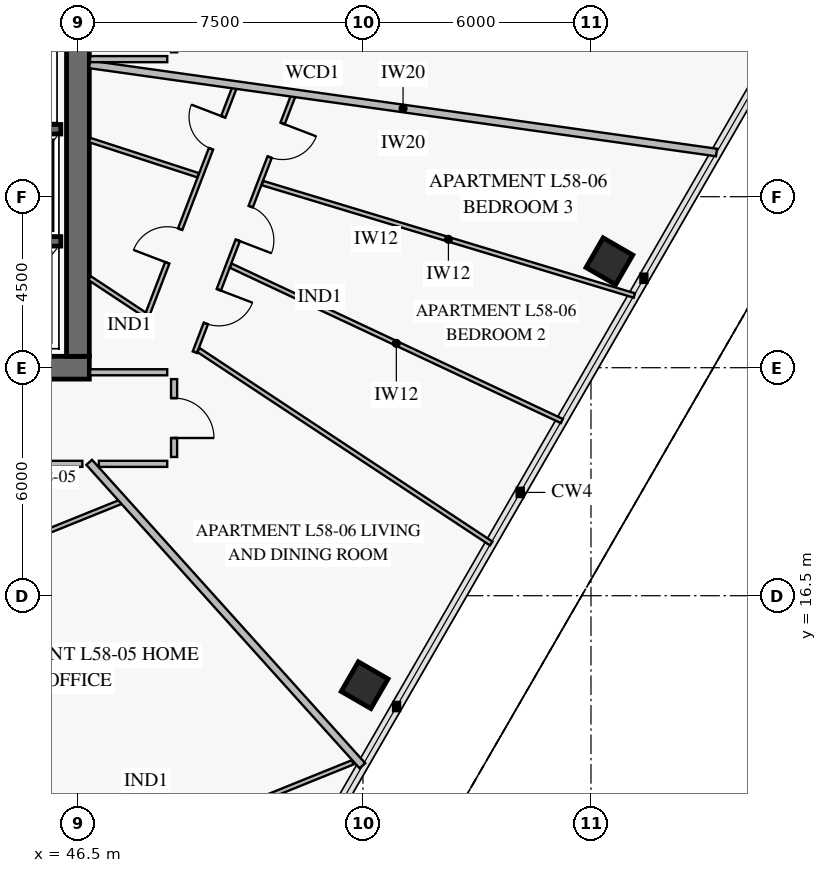
"""IFC4 building model, lengths in metres.
Left out: names, types, materials, properties, quantities, classifications, styles, units other than length and angle.
Written with IfcOpenShell. Run it as: python <this file> out.ifc"""

import sys

from ifc_helpers import new_model, si_unit, direction, frame, frame_2d, origin, origin_2d, place, context, subcontext, project, spatial, rectangle, extrude, element, fill, save


model = new_model("IFC4")
c1 = context("Model", 3, precision=1e-05, world=origin(), true_north=direction((0.0, 1.0)))
c2 = subcontext(c1, "Body", "Model", "MODEL_VIEW")
j1 = project(units=[si_unit("LENGTHUNIT", "METRE"), si_unit("PLANEANGLEUNIT", "RADIAN")], contexts=[c1])
p1 = place(None, origin())
s1 = spatial("IfcSite", under=j1, at=p1, CompositionType="ELEMENT")
p2 = place(p1, origin())
s2 = spatial("IfcBuilding", under=s1, at=p2, CompositionType="ELEMENT")
p3 = place(p2, frame((0.0, 0.0, 231.2)))
s3 = spatial("IfcBuildingStorey", under=s2, at=p3, CompositionType="ELEMENT", Elevation=231.2)
p4 = place(p3, frame((37.35, 22.5, 0.0), z_axis=(0.0, 0.0, 1.0), x_axis=(1.0, 0.0, 0.0)))
e1 = element("IfcWall", 1, at=p4, inside=s3, PredefinedType="SHEAR", context=c2, shape_type="SweptSolid", body=[
    extrude(rectangle(XDim=9.45, YDim=0.6, at=frame_2d((4.725, 0.0))), origin(), (0.0, 0.0, 1.0), 3.8),
])
p5 = place(p4, frame((3.95, 0.0, 0.0)))
e2 = element("IfcOpeningElement", 2, at=p5, cuts=e1, PredefinedType="OPENING", context=c2, shape_type="SweptSolid", body=[
    extrude(rectangle(XDim=1.5, YDim=2.15, at=frame_2d((0.75, 1.075))), frame((0.0, 0.312, 0.0), z_axis=(0.0, -1.0, 0.0), x_axis=(1.0, 0.0, 0.0)), (0.0, 0.0, 1.0), 0.624),
])
p6 = place(p3, frame((46.5, 22.8, 0.0), z_axis=(0.0, 0.0, 1.0), x_axis=(0.0, 1.0, 0.0)))
e3 = element("IfcWall", 3, at=p6, inside=s3, PredefinedType="SHEAR", context=c2, shape_type="SweptSolid", body=[
    extrude(rectangle(XDim=18.4, YDim=0.6, at=frame_2d((9.2, 0.0))), origin(), (0.0, 0.0, 1.0), 3.8),
])
p7 = place(p6, frame((8.95, 0.0, 0.0)))
e4 = element("IfcOpeningElement", 4, at=p7, cuts=e3, PredefinedType="OPENING", context=c2, shape_type="SweptSolid", body=[
    extrude(rectangle(XDim=1.1, YDim=2.15, at=frame_2d((0.55, 1.075))), frame((0.0, 0.312, 0.0), z_axis=(0.0, -1.0, 0.0), x_axis=(1.0, 0.0, 0.0)), (0.0, 0.0, 1.0), 0.624),
])
for number, where, z_axis, x_axis in (
    (5, (54.044, 14.145, 0.0), (0.0, 0.0, 1.0), (0.5, 0.866, 0.0)),
    (6, (60.485, 25.301, 0.0), (0.0, 0.0, 1.0), (0.5, 0.866, 0.0)),
):
    element("IfcColumn", number, at=place(p3, frame(where, z_axis=z_axis, x_axis=x_axis)), inside=s3, PredefinedType="COLUMN", context=c2, shape_type="SweptSolid", body=[
        extrude(rectangle(XDim=0.9, YDim=0.9, at=origin_2d()), origin(), (0.0, 0.0, 1.0), 3.55),
    ])
for number, where, z_axis, x_axis in (
    (7, (43.8, 25.825, 0.0), (0.0, 0.0, 1.0), (1.0, 0.0, 0.0)),
    (8, (43.8, 28.775, 0.0), (0.0, 0.0, 1.0), (1.0, 0.0, 0.0)),
):
    element("IfcWall", number, at=place(p3, frame(where, z_axis=z_axis, x_axis=x_axis)), inside=s3, PredefinedType="SOLIDWALL", context=c2, shape_type="SweptSolid", body=[
        extrude(rectangle(XDim=2.25, YDim=0.25, at=frame_2d((1.125, 0.0))), origin(), (0.0, 0.0, 1.0), 3.8),
    ])
p8 = place(p3, frame((43.554, 8.004, 0.0), z_axis=(0.0, 0.0, 1.0), x_axis=(0.927183582348, 0.374607267179, 0.0)))
e9 = element("IfcWall", 9, at=p8, inside=s3, PredefinedType="PARTITIONING", context=c2, shape_type="SweptSolid", body=[
    extrude(rectangle(XDim=10.972, YDim=0.12, at=frame_2d((5.486, 0.0))), origin(), (0.0, 0.0, 1.0), 2.93),
])
p9 = place(p8, frame((4.927, 0.0, 0.0)))
e10 = element("IfcOpeningElement", 10, at=p9, cuts=e9, PredefinedType="OPENING", context=c2, shape_type="SweptSolid", body=[
    extrude(rectangle(XDim=0.95, YDim=2.1, at=frame_2d((0.475, 1.05))), frame((0.0, 0.072, 0.0), z_axis=(0.0, -1.0, 0.0), x_axis=(1.0, 0.0, 0.0)), (0.0, 0.0, 1.0), 0.144),
])
p10 = place(p3, frame((48.278, 23.766, 0.0), z_axis=(0.0, 0.0, 1.0), x_axis=(0.358042156754, 0.933705421419, 0.0)))
e11 = element("IfcWall", 11, at=p10, inside=s3, PredefinedType="PARTITIONING", context=c2, shape_type="SweptSolid", body=[
    extrude(rectangle(XDim=6.584, YDim=0.12, at=frame_2d((3.292, 0.0))), origin(), (0.0, 0.0, 1.0), 2.95),
])
p11 = place(p10, frame((1.599, 0.0, 0.0)))
e12 = element("IfcOpeningElement", 12, at=p11, cuts=e11, PredefinedType="OPENING", context=c2, shape_type="SweptSolid", body=[
    extrude(rectangle(XDim=0.95, YDim=2.1, at=frame_2d((0.475, 1.05))), frame((0.0, 0.072, 0.0), z_axis=(0.0, -1.0, 0.0), x_axis=(1.0, 0.0, 0.0)), (0.0, 0.0, 1.0), 0.144),
])
p12 = place(p10, frame((4.814, 0.0, 0.0)))
e13 = element("IfcOpeningElement", 13, at=p12, cuts=e11, PredefinedType="OPENING", context=c2, shape_type="SweptSolid", body=[
    extrude(rectangle(XDim=0.9, YDim=2.1, at=frame_2d((0.45, 1.05))), frame((0.0, 0.072, 0.0), z_axis=(0.0, -1.0, 0.0), x_axis=(1.0, 0.0, 0.0)), (0.0, 0.0, 1.0), 0.144),
])
p13 = place(p3, frame((49.576, 22.908, 0.0), z_axis=(0.0, 0.0, 1.0), x_axis=(0.358041112014, 0.933705822038, 0.0)))
e14 = element("IfcWall", 14, at=p13, inside=s3, PredefinedType="PARTITIONING", context=c2, shape_type="SweptSolid", body=[
    extrude(rectangle(XDim=7.257, YDim=0.12, at=frame_2d((3.629, 0.0))), origin(), (0.0, 0.0, 1.0), 2.95),
])
p14 = place(p13, frame((0.81, 0.0, 0.0)))
e15 = element("IfcOpeningElement", 15, at=p14, cuts=e14, PredefinedType="OPENING", context=c2, shape_type="SweptSolid", body=[
    extrude(rectangle(XDim=0.95, YDim=2.1, at=frame_2d((0.475, 1.05))), frame((0.0, 0.072, 0.0), z_axis=(0.0, -1.0, 0.0), x_axis=(1.0, 0.0, 0.0)), (0.0, 0.0, 1.0), 0.144),
])
p15 = place(p13, frame((3.154, 0.0, 0.0)))
e16 = element("IfcOpeningElement", 16, at=p15, cuts=e14, PredefinedType="OPENING", context=c2, shape_type="SweptSolid", body=[
    extrude(rectangle(XDim=0.95, YDim=2.1, at=frame_2d((0.475, 1.05))), frame((0.0, 0.072, 0.0), z_axis=(0.0, -1.0, 0.0), x_axis=(1.0, 0.0, 0.0)), (0.0, 0.0, 1.0), 0.144),
])
p16 = place(p13, frame((5.497, 0.0, 0.0)))
e17 = element("IfcOpeningElement", 17, at=p16, cuts=e14, PredefinedType="OPENING", context=c2, shape_type="SweptSolid", body=[
    extrude(rectangle(XDim=0.95, YDim=2.1, at=frame_2d((0.475, 1.05))), frame((0.0, 0.072, 0.0), z_axis=(0.0, -1.0, 0.0), x_axis=(1.0, 0.0, 0.0)), (0.0, 0.0, 1.0), 0.144),
])
p17 = place(p3, frame((49.03, 20.151, 0.0), z_axis=(0.0, 0.0, 1.0), x_axis=(0.0, 1.0, 0.0)))
e18 = element("IfcWall", 18, at=p17, inside=s3, PredefinedType="PARTITIONING", context=c2, shape_type="SweptSolid", body=[
    extrude(rectangle(XDim=2.049, YDim=0.16, at=frame_2d((1.024, 0.0))), origin(), (0.0, 0.0, 1.0), 3.55),
])
p18 = place(p17, frame((0.499, 0.0, 0.0)))
e19 = element("IfcOpeningElement", 19, at=p18, cuts=e18, PredefinedType="OPENING", context=c2, shape_type="SweptSolid", body=[
    extrude(rectangle(XDim=1.05, YDim=2.15, at=frame_2d((0.525, 1.075))), frame((0.0, 0.092, 0.0), z_axis=(0.0, -1.0, 0.0), x_axis=(1.0, 0.0, 0.0)), (0.0, 0.0, 1.0), 0.184),
])
p19 = place(p3, frame((40.973, 16.281, 0.0), z_axis=(0.0, 0.0, 1.0), x_axis=(0.927185708854, 0.374602003862, 0.0)))
e20 = element("IfcWall", 20, at=p19, inside=s3, PredefinedType="PARTITIONING", context=c2, shape_type="SweptSolid", body=[
    extrude(rectangle(XDim=7.204, YDim=0.12, at=frame_2d((3.602, 0.0))), origin(), (0.0, 0.0, 1.0), 3.55),
])
p20 = place(p3, frame((46.796, 20.01, 0.0), z_axis=(0.0, 0.0, 1.0), x_axis=(0.669124143022, -0.743150645041, 0.0)))
e21 = element("IfcWall", 21, at=p20, inside=s3, PredefinedType="PARTITIONING", context=c2, shape_type="SweptSolid", body=[
    extrude(rectangle(XDim=10.745, YDim=0.2, at=frame_2d((5.373, 0.0))), origin(), (0.0, 0.0, 1.0), 2.93),
])
p21 = place(p3, frame((46.808, 28.491, 0.0), z_axis=(0.0, 0.0, 1.0), x_axis=(0.951120145706, -0.308821094538, 0.0)))
e22 = element("IfcWall", 22, at=p21, inside=s3, PredefinedType="PARTITIONING", context=c2, shape_type="SweptSolid", body=[
    extrude(rectangle(XDim=3.0, YDim=0.12, at=frame_2d((1.5, 0.0))), origin(), (0.0, 0.0, 1.0), 3.55),
])
p22 = place(p3, frame((50.522, 25.185, 0.0), z_axis=(0.0, 0.0, 1.0), x_axis=(0.905267210554, -0.424842650278, 0.0)))
e23 = element("IfcWall", 23, at=p22, inside=s3, PredefinedType="PARTITIONING", context=c2, shape_type="SweptSolid", body=[
    extrude(rectangle(XDim=9.624, YDim=0.12, at=frame_2d((4.812, 0.0))), origin(), (0.0, 0.0, 1.0), 2.93),
])
p23 = place(p3, frame((51.356, 27.358, 0.0), z_axis=(0.0, 0.0, 1.0), x_axis=(0.957218811374, -0.289365075903, 0.0)))
e24 = element("IfcWall", 24, at=p23, inside=s3, PredefinedType="PARTITIONING", context=c2, shape_type="SweptSolid", body=[
    extrude(rectangle(XDim=10.223, YDim=0.12, at=frame_2d((5.112, 0.0))), origin(), (0.0, 0.0, 1.0), 2.93),
])
p24 = place(p3, frame((46.808, 24.857, 0.0), z_axis=(0.0, 0.0, 1.0), x_axis=(0.834229042932, -0.551418084514, 0.0)))
e25 = element("IfcWall", 25, at=p24, inside=s3, PredefinedType="PARTITIONING", context=c2, shape_type="SweptSolid", body=[
    extrude(rectangle(XDim=1.736, YDim=0.12, at=frame_2d((0.868, 0.0))), origin(), (0.0, 0.0, 1.0), 3.55),
])
p25 = place(p3, frame((49.671, 22.965, 0.0), z_axis=(0.0, 0.0, 1.0), x_axis=(0.834276896683, -0.551345680731, 0.0)))
e26 = element("IfcWall", 26, at=p25, inside=s3, PredefinedType="PARTITIONING", context=c2, shape_type="SweptSolid", body=[
    extrude(rectangle(XDim=9.233, YDim=0.12, at=frame_2d((4.616, 0.0))), origin(), (0.0, 0.0, 1.0), 2.93),
])
p26 = place(p3, frame((46.808, 30.481, 0.0), z_axis=(0.0, 0.0, 1.0), x_axis=(0.990266776737, -0.139182293739, 0.0)))
e27 = element("IfcWall", 27, at=p26, inside=s3, PredefinedType="PARTITIONING", context=c2, shape_type="SweptSolid", body=[
    extrude(rectangle(XDim=16.657, YDim=0.2, at=frame_2d((8.329, 0.0))), origin(), (0.0, 0.0, 1.0), 2.93),
])
p27 = place(p3, frame((39.823, 19.97, 0.0), z_axis=(0.0, 0.0, 1.0), x_axis=(1.0, 0.0, 0.0)))
e28 = element("IfcWall", 28, at=p27, inside=s3, PredefinedType="PARTITIONING", context=c2, shape_type="SweptSolid", body=[
    extrude(rectangle(XDim=6.794, YDim=0.16, at=frame_2d((3.397, 0.0))), origin(), (0.0, 0.0, 1.0), 3.55),
])
p28 = place(p3, frame((48.849, 22.38, 0.0), z_axis=(0.0, 0.0, 1.0), x_axis=(-1.0, 0.0, 0.0)))
e29 = element("IfcWall", 29, at=p28, inside=s3, PredefinedType="PARTITIONING", context=c2, shape_type="SweptSolid", body=[
    extrude(rectangle(XDim=2.029, YDim=0.16, at=frame_2d((1.015, 0.0))), origin(), (0.0, 0.0, 1.0), 3.55),
])
p29 = place(p3, frame((47.051, 19.97, 0.0), z_axis=(0.0, 0.0, 1.0), x_axis=(1.0, 0.0, 0.0)))
e30 = element("IfcWall", 30, at=p29, inside=s3, PredefinedType="PARTITIONING", context=c2, shape_type="SweptSolid", body=[
    extrude(rectangle(XDim=1.799, YDim=0.16, at=frame_2d((0.899, 0.0))), origin(), (0.0, 0.0, 1.0), 2.95),
])
p30 = place(p3, frame((46.82, 30.62, 0.0), z_axis=(0.0, 0.0, 1.0), x_axis=(1.0, 0.0, 0.0)))
e31 = element("IfcWall", 31, at=p30, inside=s3, PredefinedType="PARTITIONING", context=c2, shape_type="SweptSolid", body=[
    extrude(rectangle(XDim=2.03, YDim=0.16, at=frame_2d((1.015, 0.0))), origin(), (0.0, 0.0, 1.0), 3.55),
])
p31 = place(p11, origin())
e32 = element("IfcDoor", 32, at=p31, inside=s3, OperationType="SINGLE_SWING_LEFT", PredefinedType="DOOR", context=c2, shape_type="SweptSolid", body=[
    extrude(rectangle(XDim=0.95, YDim=2.1, at=frame_2d((0.475, 1.05))), frame((0.0, 0.025, 0.0), z_axis=(0.0, -1.0, 0.0), x_axis=(1.0, 0.0, 0.0)), (0.0, 0.0, 1.0), 0.05),
])
fill(e12, e32)
p32 = place(p12, origin())
e33 = element("IfcDoor", 33, at=p32, inside=s3, OperationType="SINGLE_SWING_RIGHT", PredefinedType="DOOR", context=c2, shape_type="SweptSolid", body=[
    extrude(rectangle(XDim=0.9, YDim=2.1, at=frame_2d((0.45, 1.05))), frame((0.0, 0.025, 0.0), z_axis=(0.0, -1.0, 0.0), x_axis=(1.0, 0.0, 0.0)), (0.0, 0.0, 1.0), 0.05),
])
fill(e13, e33)
p33 = place(p14, frame((0.95, 0.0, 0.0), z_axis=(0.0, 0.0, 1.0), x_axis=(-1.0, 0.0, 0.0)))
e34 = element("IfcDoor", 34, at=p33, inside=s3, OperationType="SINGLE_SWING_LEFT", PredefinedType="DOOR", context=c2, shape_type="SweptSolid", body=[
    extrude(rectangle(XDim=0.95, YDim=2.1, at=frame_2d((0.475, 1.05))), frame((0.0, 0.025, 0.0), z_axis=(0.0, -1.0, 0.0), x_axis=(1.0, 0.0, 0.0)), (0.0, 0.0, 1.0), 0.05),
])
fill(e15, e34)
p34 = place(p15, frame((0.95, 0.0, 0.0), z_axis=(0.0, 0.0, 1.0), x_axis=(-1.0, 0.0, 0.0)))
e35 = element("IfcDoor", 35, at=p34, inside=s3, OperationType="SINGLE_SWING_RIGHT", PredefinedType="DOOR", context=c2, shape_type="SweptSolid", body=[
    extrude(rectangle(XDim=0.95, YDim=2.1, at=frame_2d((0.475, 1.05))), frame((0.0, 0.025, 0.0), z_axis=(0.0, -1.0, 0.0), x_axis=(1.0, 0.0, 0.0)), (0.0, 0.0, 1.0), 0.05),
])
fill(e16, e35)
p35 = place(p16, frame((0.95, 0.0, 0.0), z_axis=(0.0, 0.0, 1.0), x_axis=(-1.0, 0.0, 0.0)))
e36 = element("IfcDoor", 36, at=p35, inside=s3, OperationType="SINGLE_SWING_LEFT", PredefinedType="DOOR", context=c2, shape_type="SweptSolid", body=[
    extrude(rectangle(XDim=0.95, YDim=2.1, at=frame_2d((0.475, 1.05))), frame((0.0, 0.025, 0.0), z_axis=(0.0, -1.0, 0.0), x_axis=(1.0, 0.0, 0.0)), (0.0, 0.0, 1.0), 0.05),
])
fill(e17, e36)
p36 = place(p18, frame((1.05, 0.0, 0.0), z_axis=(0.0, 0.0, 1.0), x_axis=(-1.0, 0.0, 0.0)))
e37 = element("IfcDoor", 37, at=p36, inside=s3, OperationType="SINGLE_SWING_RIGHT", PredefinedType="DOOR", context=c2, shape_type="SweptSolid", body=[
    extrude(rectangle(XDim=1.05, YDim=2.15, at=frame_2d((0.525, 1.075))), frame((0.0, 0.025, 0.0), z_axis=(0.0, -1.0, 0.0), x_axis=(1.0, 0.0, 0.0)), (0.0, 0.0, 1.0), 0.05),
])
fill(e19, e37)
save(model, sys.argv[1])
